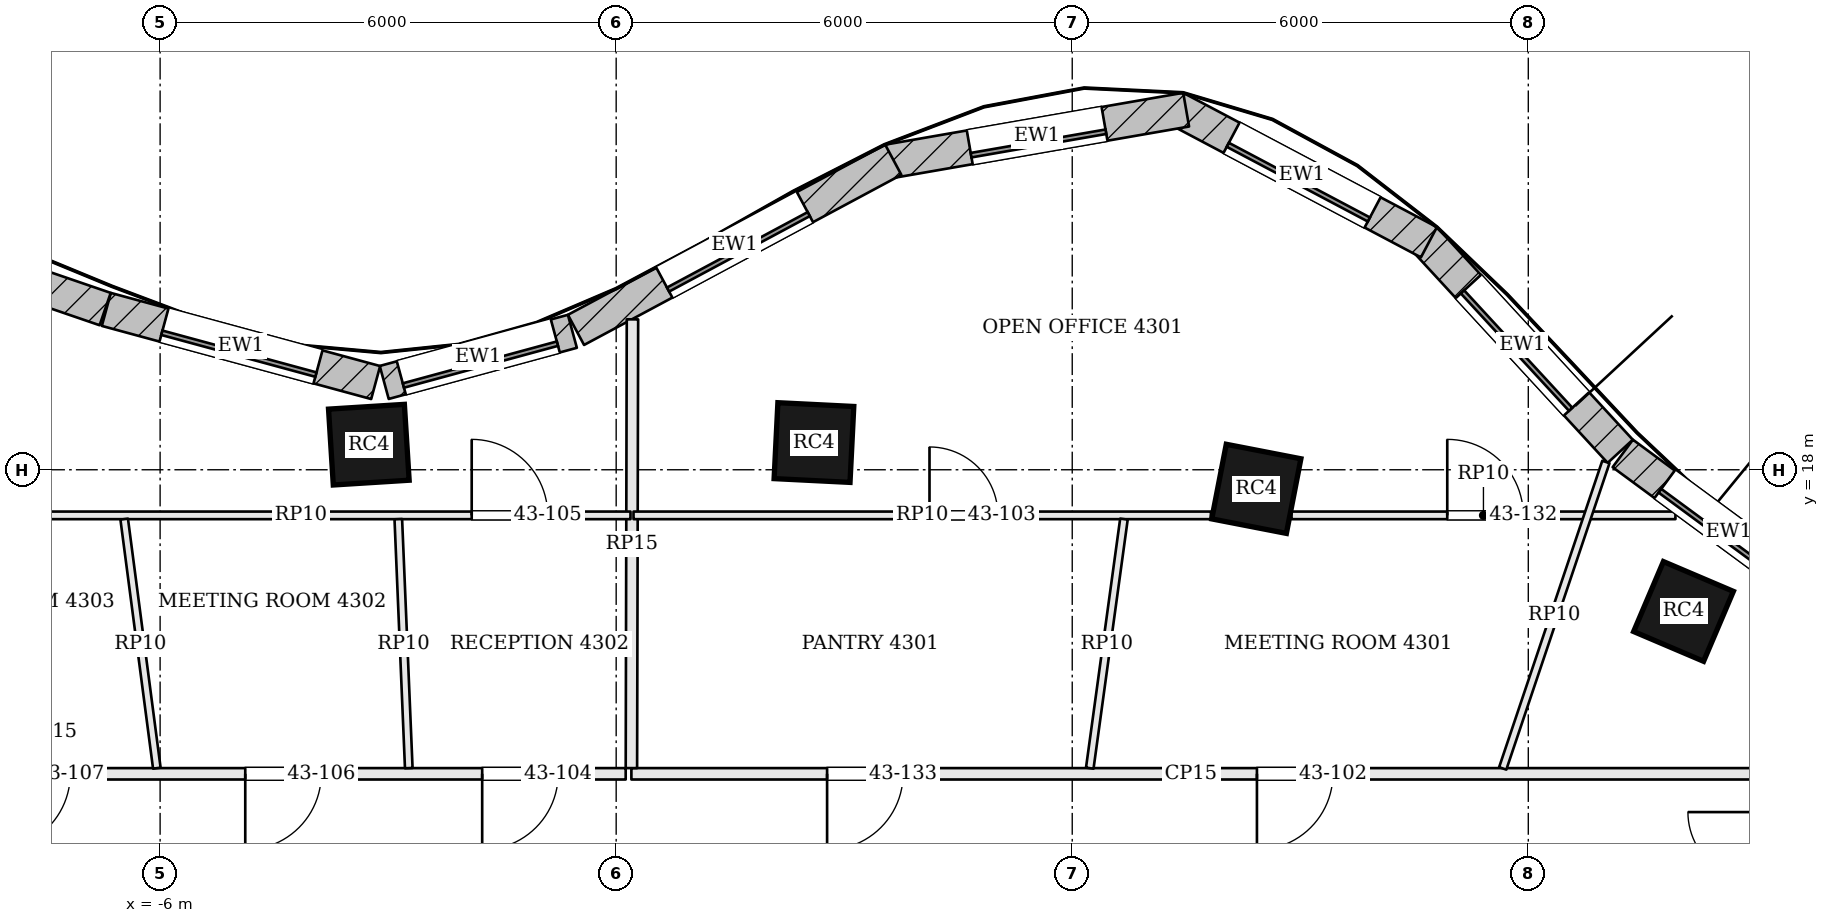
"""IFC4 building model, lengths in metres.
Left out: names, types, materials, properties, quantities, classifications, styles, units other than length and angle.
Written with IfcOpenShell. Run it as: python <this file> out.ifc"""

import sys

from ifc_helpers import new_model, si_unit, direction, frame, frame_2d, origin, origin_2d, place, context, subcontext, project, spatial, rectangle, extrude, element, fill, save


model = new_model("IFC4")
c1 = context("Model", 3, precision=1e-05, world=origin(), true_north=direction((0.0, 1.0)))
c2 = subcontext(c1, "Body", "Model", "MODEL_VIEW")
j1 = project(units=[si_unit("LENGTHUNIT", "METRE"), si_unit("PLANEANGLEUNIT", "RADIAN")], contexts=[c1])
p1 = place(None, origin())
s1 = spatial("IfcSite", under=j1, at=p1, CompositionType="ELEMENT")
p2 = place(p1, origin())
s2 = spatial("IfcBuilding", under=s1, at=p2, CompositionType="ELEMENT")
p3 = place(p2, frame((0.0, 0.0, 177.9)))
s3 = spatial("IfcBuildingStorey", under=s2, at=p3, CompositionType="ELEMENT", Elevation=177.9)
for number, where, z_axis, x_axis in (
    (1, (14.042, 16.136, 0.0), (0.0, 0.0, 1.0), (-0.92, 0.392, 0.0)),
    (2, (8.422, 17.749, 0.0), (0.0, 0.0, 1.0), (-0.982, 0.191, 0.0)),
    (3, (2.602, 18.358, 0.0), (0.0, 0.0, 1.0), (-0.999, 0.05, 0.0)),
    (4, (-3.254, 18.33, 0.0), (0.0, 0.0, 1.0), (-0.998, -0.063, 0.0)),
):
    element("IfcColumn", number, at=place(p3, frame(where, z_axis=z_axis, x_axis=x_axis)), inside=s3, PredefinedType="COLUMN", context=c2, shape_type="SweptSolid", body=[
        extrude(rectangle(XDim=1.0, YDim=1.0, at=origin_2d()), origin(), (0.0, 0.0, 1.0), 3.9),
    ])
p4 = place(p3, frame((16.036, 16.158, 0.0), z_axis=(0.0, 0.0, 1.0), x_axis=(-0.805181432967, 0.593028549064, 0.0)))
e5 = element("IfcWall", 5, at=p4, inside=s3, PredefinedType="SOLIDWALL", context=c2, shape_type="SweptSolid", body=[
    extrude(rectangle(XDim=3.469, YDim=0.45, at=frame_2d((1.734, 0.0))), origin(), (0.0, 0.0, 1.0), 3.7),
])
p5 = place(p4, frame((0.684, 0.0, 0.9)))
e6 = element("IfcOpeningElement", 6, at=p5, cuts=e5, PredefinedType="OPENING", context=c2, shape_type="SweptSolid", body=[
    extrude(rectangle(XDim=2.1, YDim=2.3, at=frame_2d((1.05, 1.15))), frame((0.0, 0.235, 0.0), z_axis=(0.0, -1.0, 0.0), x_axis=(1.0, 0.0, 0.0)), (0.0, 0.0, 1.0), 0.47),
])
p6 = place(p3, frame((13.209, 18.243, 0.0), z_axis=(0.0, 0.0, 1.0), x_axis=(-0.677612152497, 0.735419452278, 0.0)))
e7 = element("IfcWall", 7, at=p6, inside=s3, PredefinedType="SOLIDWALL", context=c2, shape_type="SweptSolid", body=[
    extrude(rectangle(XDim=3.797, YDim=0.45, at=frame_2d((1.898, 0.0))), origin(), (0.0, 0.0, 1.0), 3.7),
])
p7 = place(p6, frame((0.848, 0.0, 0.9)))
e8 = element("IfcOpeningElement", 8, at=p7, cuts=e7, PredefinedType="OPENING", context=c2, shape_type="SweptSolid", body=[
    extrude(rectangle(XDim=2.1, YDim=2.3, at=frame_2d((1.05, 1.15))), frame((0.0, 0.235, 0.0), z_axis=(0.0, -1.0, 0.0), x_axis=(1.0, 0.0, 0.0)), (0.0, 0.0, 1.0), 0.47),
])
p8 = place(p3, frame((10.693, 20.993, 0.0), z_axis=(0.0, 0.0, 1.0), x_axis=(-0.883817790726, 0.46783128668, 0.0)))
e9 = element("IfcWall", 9, at=p8, inside=s3, PredefinedType="SOLIDWALL", context=c2, shape_type="SweptSolid", body=[
    extrude(rectangle(XDim=3.777, YDim=0.45, at=frame_2d((1.888, 0.0))), origin(), (0.0, 0.0, 1.0), 3.7),
])
p9 = place(p8, frame((0.838, 0.0, 0.9)))
e10 = element("IfcOpeningElement", 10, at=p9, cuts=e9, PredefinedType="OPENING", context=c2, shape_type="SweptSolid", body=[
    extrude(rectangle(XDim=2.1, YDim=2.3, at=frame_2d((1.05, 1.15))), frame((0.0, 0.235, 0.0), z_axis=(0.0, -1.0, 0.0), x_axis=(1.0, 0.0, 0.0)), (0.0, 0.0, 1.0), 0.47),
])
p10 = place(p3, frame((7.499, 22.737, 0.0), z_axis=(0.0, 0.0, 1.0), x_axis=(-0.98521220506, -0.171338585849, 0.0)))
e11 = element("IfcWall", 11, at=p10, inside=s3, PredefinedType="SOLIDWALL", context=c2, shape_type="SweptSolid", body=[
    extrude(rectangle(XDim=3.98, YDim=0.45, at=frame_2d((1.99, 0.0))), origin(), (0.0, 0.0, 1.0), 3.7),
])
p11 = place(p10, frame((1.09, 0.0, 0.9)))
e12 = element("IfcOpeningElement", 12, at=p11, cuts=e11, PredefinedType="OPENING", context=c2, shape_type="SweptSolid", body=[
    extrude(rectangle(XDim=1.8, YDim=2.3, at=frame_2d((0.9, 1.15))), frame((0.0, 0.235, 0.0), z_axis=(0.0, -1.0, 0.0), x_axis=(1.0, 0.0, 0.0)), (0.0, 0.0, 1.0), 0.47),
])
p12 = place(p3, frame((3.646, 22.079, 0.0), z_axis=(0.0, 0.0, 1.0), x_axis=(-0.881279133897, -0.472596115259, 0.0)))
e13 = element("IfcWall", 13, at=p12, inside=s3, PredefinedType="SOLIDWALL", context=c2, shape_type="SweptSolid", body=[
    extrude(rectangle(XDim=4.737, YDim=0.45, at=frame_2d((2.368, 0.0))), origin(), (0.0, 0.0, 1.0), 3.7),
])
p13 = place(p12, frame((1.318, 0.0, 0.9)))
e14 = element("IfcOpeningElement", 14, at=p13, cuts=e13, PredefinedType="OPENING", context=c2, shape_type="SweptSolid", body=[
    extrude(rectangle(XDim=2.1, YDim=2.3, at=frame_2d((1.05, 1.15))), frame((0.0, 0.235, 0.0), z_axis=(0.0, -1.0, 0.0), x_axis=(1.0, 0.0, 0.0)), (0.0, 0.0, 1.0), 0.47),
])
p14 = place(p3, frame((-0.576, 19.821, 0.0), z_axis=(0.0, 0.0, 1.0), x_axis=(-0.965009398019, -0.262215296532, 0.0)))
e15 = element("IfcWall", 15, at=p14, inside=s3, PredefinedType="SOLIDWALL", context=c2, shape_type="SweptSolid", body=[
    extrude(rectangle(XDim=2.565, YDim=0.45, at=frame_2d((1.283, 0.0))), origin(), (0.0, 0.0, 1.0), 3.7),
])
p15 = place(p14, frame((0.233, 0.0, 0.9)))
e16 = element("IfcOpeningElement", 16, at=p15, cuts=e15, PredefinedType="OPENING", context=c2, shape_type="SweptSolid", body=[
    extrude(rectangle(XDim=2.1, YDim=2.3, at=frame_2d((1.05, 1.15))), frame((0.0, 0.235, 0.0), z_axis=(0.0, -1.0, 0.0), x_axis=(1.0, 0.0, 0.0)), (0.0, 0.0, 1.0), 0.47),
])
p16 = place(p3, frame((-3.164, 19.147, 0.0), z_axis=(0.0, 0.0, 1.0), x_axis=(-0.965039479998, 0.262104563191, 0.0)))
e17 = element("IfcWall", 17, at=p16, inside=s3, PredefinedType="SOLIDWALL", context=c2, shape_type="SweptSolid", body=[
    extrude(rectangle(XDim=3.672, YDim=0.45, at=frame_2d((1.836, 0.0))), origin(), (0.0, 0.0, 1.0), 3.7),
])
p17 = place(p16, frame((0.786, 0.0, 0.9)))
e18 = element("IfcOpeningElement", 18, at=p17, cuts=e17, PredefinedType="OPENING", context=c2, shape_type="SweptSolid", body=[
    extrude(rectangle(XDim=2.1, YDim=2.3, at=frame_2d((1.05, 1.15))), frame((0.0, 0.235, 0.0), z_axis=(0.0, -1.0, 0.0), x_axis=(1.0, 0.0, 0.0)), (0.0, 0.0, 1.0), 0.47),
])
p18 = place(p3, frame((-6.723, 20.114, 0.0), z_axis=(0.0, 0.0, 1.0), x_axis=(-0.945947299026, 0.324320377815, 0.0)))
e19 = element("IfcWall", 19, at=p18, inside=s3, PredefinedType="SOLIDWALL", context=c2, shape_type="SweptSolid", body=[
    extrude(rectangle(XDim=4.745, YDim=0.45, at=frame_2d((2.372, 0.0))), origin(), (0.0, 0.0, 1.0), 3.7),
])
p19 = place(p18, frame((1.322, 0.0, 0.9)))
e20 = element("IfcOpeningElement", 20, at=p19, cuts=e19, PredefinedType="OPENING", context=c2, shape_type="SweptSolid", body=[
    extrude(rectangle(XDim=2.1, YDim=2.3, at=frame_2d((1.05, 1.15))), frame((0.0, 0.235, 0.0), z_axis=(0.0, -1.0, 0.0), x_axis=(1.0, 0.0, 0.0)), (0.0, 0.0, 1.0), 0.47),
])
p20 = place(p3, frame((14.925, 14.0, 0.0), z_axis=(0.0, 0.0, 1.0), x_axis=(-1.0, 0.0, 0.0)))
e21 = element("IfcWall", 21, at=p20, inside=s3, PredefinedType="PARTITIONING", context=c2, shape_type="SweptSolid", body=[
    extrude(rectangle(XDim=14.725, YDim=0.15, at=frame_2d((7.362, 0.0))), origin(), (0.0, 0.0, 1.0), 3.084),
])
p21 = place(p20, frame((5.495, 0.0, 0.0)))
e22 = element("IfcOpeningElement", 22, at=p21, cuts=e21, PredefinedType="OPENING", context=c2, shape_type="SweptSolid", body=[
    extrude(rectangle(XDim=1.0, YDim=2.4, at=frame_2d((0.5, 1.2))), frame((0.0, 0.085, 0.0), z_axis=(0.0, -1.0, 0.0), x_axis=(1.0, 0.0, 0.0)), (0.0, 0.0, 1.0), 0.17),
])
p22 = place(p20, frame((11.15, 0.0, 0.0)))
e23 = element("IfcOpeningElement", 23, at=p22, cuts=e21, PredefinedType="OPENING", context=c2, shape_type="SweptSolid", body=[
    extrude(rectangle(XDim=1.0, YDim=2.1, at=frame_2d((0.5, 1.05))), frame((0.0, 0.085, 0.0), z_axis=(0.0, -1.0, 0.0), x_axis=(1.0, 0.0, 0.0)), (0.0, 0.0, 1.0), 0.17),
])
p23 = place(p3, frame((0.214, 19.979, 0.0), z_axis=(0.0, 0.0, 1.0), x_axis=(-0.002357118586, -0.999997221992, 0.0)))
e24 = element("IfcWall", 24, at=p23, inside=s3, PredefinedType="PARTITIONING", context=c2, shape_type="SweptSolid", body=[
    extrude(rectangle(XDim=5.904, YDim=0.15, at=frame_2d((2.952, 0.0))), origin(), (0.0, 0.0, 1.0), 3.234),
])
p24 = place(p3, frame((0.125, 14.0, 0.0), z_axis=(0.0, 0.0, 1.0), x_axis=(-1.0, 0.0, 0.0)))
e25 = element("IfcWall", 25, at=p24, inside=s3, PredefinedType="PARTITIONING", context=c2, shape_type="SweptSolid", body=[
    extrude(rectangle(XDim=15.125, YDim=0.15, at=frame_2d((7.562, 0.0))), origin(), (0.0, 0.0, 1.0), 3.084),
])
p25 = place(p24, frame((0.888, 0.0, 0.0)))
e26 = element("IfcOpeningElement", 26, at=p25, cuts=e25, PredefinedType="OPENING", context=c2, shape_type="SweptSolid", body=[
    extrude(rectangle(XDim=1.0, YDim=2.1, at=frame_2d((0.5, 1.05))), frame((0.0, 0.085, 0.0), z_axis=(0.0, -1.0, 0.0), x_axis=(1.0, 0.0, 0.0)), (0.0, 0.0, 1.0), 0.17),
])
p26 = place(p24, frame((4.005, 0.0, 0.0)))
e27 = element("IfcOpeningElement", 27, at=p26, cuts=e25, PredefinedType="OPENING", context=c2, shape_type="SweptSolid", body=[
    extrude(rectangle(XDim=1.0, YDim=2.4, at=frame_2d((0.5, 1.2))), frame((0.0, 0.085, 0.0), z_axis=(0.0, -1.0, 0.0), x_axis=(1.0, 0.0, 0.0)), (0.0, 0.0, 1.0), 0.17),
])
p27 = place(p24, frame((7.307, 0.0, 0.0)))
e28 = element("IfcOpeningElement", 28, at=p27, cuts=e25, PredefinedType="OPENING", context=c2, shape_type="SweptSolid", body=[
    extrude(rectangle(XDim=1.0, YDim=2.4, at=frame_2d((0.5, 1.2))), frame((0.0, 0.085, 0.0), z_axis=(0.0, -1.0, 0.0), x_axis=(1.0, 0.0, 0.0)), (0.0, 0.0, 1.0), 0.17),
])
p28 = place(p3, frame((0.228, 17.4, 0.0), z_axis=(0.0, 0.0, 1.0), x_axis=(1.0, 0.0, 0.0)))
e29 = element("IfcWall", 29, at=p28, inside=s3, PredefinedType="PARTITIONING", context=c2, shape_type="SweptSolid", body=[
    extrude(rectangle(XDim=7.596, YDim=0.1, at=frame_2d((3.798, 0.0))), origin(), (0.0, 0.0, 1.0), 3.084),
])
p29 = place(p28, frame((3.894, 0.0, 0.0)))
e30 = element("IfcOpeningElement", 30, at=p29, cuts=e29, PredefinedType="OPENING", context=c2, shape_type="SweptSolid", body=[
    extrude(rectangle(XDim=0.9, YDim=2.1, at=frame_2d((0.45, 1.05))), frame((0.0, 0.06, 0.0), z_axis=(0.0, -1.0, 0.0), x_axis=(1.0, 0.0, 0.0)), (0.0, 0.0, 1.0), 0.12),
])
p30 = place(p3, frame((8.884, 17.4, 0.0), z_axis=(0.0, 0.0, 1.0), x_axis=(1.0, 0.0, 0.0)))
e31 = element("IfcWall", 31, at=p30, inside=s3, PredefinedType="PARTITIONING", context=c2, shape_type="SweptSolid", body=[
    extrude(rectangle(XDim=5.052, YDim=0.1, at=frame_2d((2.526, 0.0))), origin(), (0.0, 0.0, 1.0), 3.084),
])
p31 = place(p30, frame((2.05, 0.0, 0.0)))
e32 = element("IfcOpeningElement", 32, at=p31, cuts=e31, PredefinedType="OPENING", context=c2, shape_type="SweptSolid", body=[
    extrude(rectangle(XDim=1.0, YDim=2.4, at=frame_2d((0.5, 1.2))), frame((0.0, 0.06, 0.0), z_axis=(0.0, -1.0, 0.0), x_axis=(1.0, 0.0, 0.0)), (0.0, 0.0, 1.0), 0.12),
])
p32 = place(p3, frame((11.664, 14.071, 0.0), z_axis=(0.0, 0.0, 1.0), x_axis=(0.319050122348, 0.947737843198, 0.0)))
e33 = element("IfcWall", 33, at=p32, inside=s3, PredefinedType="PARTITIONING", context=c2, shape_type="SweptSolid", body=[
    extrude(rectangle(XDim=4.254, YDim=0.1, at=frame_2d((2.127, 0.0))), origin(), (0.0, 0.0, 1.0), 3.084),
])
p33 = place(p3, frame((6.231, 14.074, 0.0), z_axis=(0.0, 0.0, 1.0), x_axis=(0.135982862237, 0.990711189589, 0.0)))
e34 = element("IfcWall", 34, at=p33, inside=s3, PredefinedType="PARTITIONING", context=c2, shape_type="SweptSolid", body=[
    extrude(rectangle(XDim=3.307, YDim=0.1, at=frame_2d((1.654, 0.0))), origin(), (0.0, 0.0, 1.0), 3.084),
])
p34 = place(p3, frame((-8.483, 17.4, 0.0), z_axis=(0.0, 0.0, 1.0), x_axis=(1.0, 0.0, 0.0)))
e35 = element("IfcWall", 35, at=p34, inside=s3, PredefinedType="PARTITIONING", context=c2, shape_type="SweptSolid", body=[
    extrude(rectangle(XDim=8.671, YDim=0.1, at=frame_2d((4.335, 0.0))), origin(), (0.0, 0.0, 1.0), 3.084),
])
p35 = place(p34, frame((6.582, 0.0, 0.0)))
e36 = element("IfcOpeningElement", 36, at=p35, cuts=e35, PredefinedType="OPENING", context=c2, shape_type="SweptSolid", body=[
    extrude(rectangle(XDim=1.0, YDim=2.1, at=frame_2d((0.5, 1.05))), frame((0.0, 0.06, 0.0), z_axis=(0.0, -1.0, 0.0), x_axis=(1.0, 0.0, 0.0)), (0.0, 0.0, 1.0), 0.12),
])
p36 = place(p3, frame((-2.729, 14.075, 0.0), z_axis=(0.0, 0.0, 1.0), x_axis=(-0.042005382394, 0.99911738442, 0.0)))
e37 = element("IfcWall", 37, at=p36, inside=s3, PredefinedType="PARTITIONING", context=c2, shape_type="SweptSolid", body=[
    extrude(rectangle(XDim=3.278, YDim=0.1, at=frame_2d((1.639, 0.0))), origin(), (0.0, 0.0, 1.0), 3.084),
])
p37 = place(p3, frame((-6.043, 14.074, 0.0), z_axis=(0.0, 0.0, 1.0), x_axis=(-0.12990779889, 0.991526078219, 0.0)))
e38 = element("IfcWall", 38, at=p37, inside=s3, PredefinedType="PARTITIONING", context=c2, shape_type="SweptSolid", body=[
    extrude(rectangle(XDim=3.304, YDim=0.1, at=frame_2d((1.652, 0.0))), origin(), (0.0, 0.0, 1.0), 3.084),
])
p38 = place(p5, origin())
e39 = element("IfcWindow", 39, at=p38, inside=s3, PartitioningType="SINGLE_PANEL", PredefinedType="WINDOW", context=c2, shape_type="SweptSolid", body=[
    extrude(rectangle(XDim=2.1, YDim=2.3, at=frame_2d((1.05, 1.15))), frame((0.0, 0.135, 0.0), z_axis=(0.0, -1.0, 0.0), x_axis=(1.0, 0.0, 0.0)), (0.0, 0.0, 1.0), 0.06),
])
fill(e6, e39)
p39 = place(p7, origin())
e40 = element("IfcWindow", 40, at=p39, inside=s3, PartitioningType="SINGLE_PANEL", PredefinedType="WINDOW", context=c2, shape_type="SweptSolid", body=[
    extrude(rectangle(XDim=2.1, YDim=2.3, at=frame_2d((1.05, 1.15))), frame((0.0, 0.135, 0.0), z_axis=(0.0, -1.0, 0.0), x_axis=(1.0, 0.0, 0.0)), (0.0, 0.0, 1.0), 0.06),
])
fill(e8, e40)
p40 = place(p9, origin())
e41 = element("IfcWindow", 41, at=p40, inside=s3, PartitioningType="SINGLE_PANEL", PredefinedType="WINDOW", context=c2, shape_type="SweptSolid", body=[
    extrude(rectangle(XDim=2.1, YDim=2.3, at=frame_2d((1.05, 1.15))), frame((0.0, 0.135, 0.0), z_axis=(0.0, -1.0, 0.0), x_axis=(1.0, 0.0, 0.0)), (0.0, 0.0, 1.0), 0.06),
])
fill(e10, e41)
p41 = place(p11, origin())
e42 = element("IfcWindow", 42, at=p41, inside=s3, PartitioningType="SINGLE_PANEL", PredefinedType="WINDOW", context=c2, shape_type="SweptSolid", body=[
    extrude(rectangle(XDim=1.8, YDim=2.3, at=frame_2d((0.9, 1.15))), frame((0.0, 0.135, 0.0), z_axis=(0.0, -1.0, 0.0), x_axis=(1.0, 0.0, 0.0)), (0.0, 0.0, 1.0), 0.06),
])
fill(e12, e42)
p42 = place(p13, origin())
e43 = element("IfcWindow", 43, at=p42, inside=s3, PartitioningType="SINGLE_PANEL", PredefinedType="WINDOW", context=c2, shape_type="SweptSolid", body=[
    extrude(rectangle(XDim=2.1, YDim=2.3, at=frame_2d((1.05, 1.15))), frame((0.0, 0.135, 0.0), z_axis=(0.0, -1.0, 0.0), x_axis=(1.0, 0.0, 0.0)), (0.0, 0.0, 1.0), 0.06),
])
fill(e14, e43)
p43 = place(p15, origin())
e44 = element("IfcWindow", 44, at=p43, inside=s3, PartitioningType="SINGLE_PANEL", PredefinedType="WINDOW", context=c2, shape_type="SweptSolid", body=[
    extrude(rectangle(XDim=2.1, YDim=2.3, at=frame_2d((1.05, 1.15))), frame((0.0, 0.135, 0.0), z_axis=(0.0, -1.0, 0.0), x_axis=(1.0, 0.0, 0.0)), (0.0, 0.0, 1.0), 0.06),
])
fill(e16, e44)
p44 = place(p17, origin())
e45 = element("IfcWindow", 45, at=p44, inside=s3, PartitioningType="SINGLE_PANEL", PredefinedType="WINDOW", context=c2, shape_type="SweptSolid", body=[
    extrude(rectangle(XDim=2.1, YDim=2.3, at=frame_2d((1.05, 1.15))), frame((0.0, 0.135, 0.0), z_axis=(0.0, -1.0, 0.0), x_axis=(1.0, 0.0, 0.0)), (0.0, 0.0, 1.0), 0.06),
])
fill(e18, e45)
p45 = place(p21, origin())
e46 = element("IfcDoor", 46, at=p45, inside=s3, OperationType="SINGLE_SWING_RIGHT", PredefinedType="DOOR", context=c2, shape_type="SweptSolid", body=[
    extrude(rectangle(XDim=1.0, YDim=2.4, at=frame_2d((0.5, 1.2))), frame((0.0, 0.025, 0.0), z_axis=(0.0, -1.0, 0.0), x_axis=(1.0, 0.0, 0.0)), (0.0, 0.0, 1.0), 0.05),
])
fill(e22, e46)
p46 = place(p29, origin())
e47 = element("IfcDoor", 47, at=p46, inside=s3, OperationType="SINGLE_SWING_LEFT", PredefinedType="DOOR", context=c2, shape_type="SweptSolid", body=[
    extrude(rectangle(XDim=0.9, YDim=2.1, at=frame_2d((0.45, 1.05))), frame((0.0, 0.025, 0.0), z_axis=(0.0, -1.0, 0.0), x_axis=(1.0, 0.0, 0.0)), (0.0, 0.0, 1.0), 0.05),
])
fill(e30, e47)
p47 = place(p25, origin())
e48 = element("IfcDoor", 48, at=p47, inside=s3, OperationType="SINGLE_SWING_RIGHT", PredefinedType="DOOR", context=c2, shape_type="SweptSolid", body=[
    extrude(rectangle(XDim=1.0, YDim=2.1, at=frame_2d((0.5, 1.05))), frame((0.0, 0.025, 0.0), z_axis=(0.0, -1.0, 0.0), x_axis=(1.0, 0.0, 0.0)), (0.0, 0.0, 1.0), 0.05),
])
fill(e26, e48)
p48 = place(p35, origin())
e49 = element("IfcDoor", 49, at=p48, inside=s3, OperationType="SINGLE_SWING_LEFT", PredefinedType="DOOR", context=c2, shape_type="SweptSolid", body=[
    extrude(rectangle(XDim=1.0, YDim=2.1, at=frame_2d((0.5, 1.05))), frame((0.0, 0.025, 0.0), z_axis=(0.0, -1.0, 0.0), x_axis=(1.0, 0.0, 0.0)), (0.0, 0.0, 1.0), 0.05),
])
fill(e36, e49)
p49 = place(p26, origin())
e50 = element("IfcDoor", 50, at=p49, inside=s3, OperationType="SINGLE_SWING_RIGHT", PredefinedType="DOOR", context=c2, shape_type="SweptSolid", body=[
    extrude(rectangle(XDim=1.0, YDim=2.4, at=frame_2d((0.5, 1.2))), frame((0.0, 0.025, 0.0), z_axis=(0.0, -1.0, 0.0), x_axis=(1.0, 0.0, 0.0)), (0.0, 0.0, 1.0), 0.05),
])
fill(e27, e50)
p50 = place(p27, origin())
e51 = element("IfcDoor", 51, at=p50, inside=s3, OperationType="SINGLE_SWING_RIGHT", PredefinedType="DOOR", context=c2, shape_type="SweptSolid", body=[
    extrude(rectangle(XDim=1.0, YDim=2.4, at=frame_2d((0.5, 1.2))), frame((0.0, 0.025, 0.0), z_axis=(0.0, -1.0, 0.0), x_axis=(1.0, 0.0, 0.0)), (0.0, 0.0, 1.0), 0.05),
])
fill(e28, e51)
p51 = place(p31, origin())
e52 = element("IfcDoor", 52, at=p51, inside=s3, OperationType="SINGLE_SWING_LEFT", PredefinedType="DOOR", context=c2, shape_type="SweptSolid", body=[
    extrude(rectangle(XDim=1.0, YDim=2.4, at=frame_2d((0.5, 1.2))), frame((0.0, 0.025, 0.0), z_axis=(0.0, -1.0, 0.0), x_axis=(1.0, 0.0, 0.0)), (0.0, 0.0, 1.0), 0.05),
])
fill(e32, e52)
p52 = place(p22, origin())
e53 = element("IfcDoor", 53, at=p52, inside=s3, OperationType="SINGLE_SWING_RIGHT", PredefinedType="DOOR", context=c2, shape_type="SweptSolid", body=[
    extrude(rectangle(XDim=1.0, YDim=2.1, at=frame_2d((0.5, 1.05))), frame((0.0, 0.025, 0.0), z_axis=(0.0, -1.0, 0.0), x_axis=(1.0, 0.0, 0.0)), (0.0, 0.0, 1.0), 0.05),
])
fill(e23, e53)
save(model, sys.argv[1])
